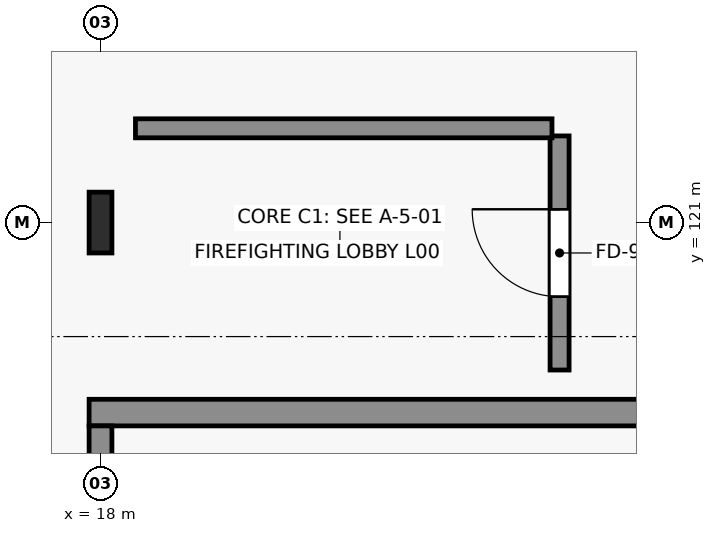
"""IFC4 building model, lengths in metres.
Left out: names, types, materials, properties, quantities, classifications, styles, units other than length and angle.
Written with IfcOpenShell. Run it as: python <this file> out.ifc"""

import sys

from ifc_helpers import new_model, si_unit, direction, frame, frame_2d, origin, origin_2d, place, context, subcontext, project, spatial, rectangle, i_section, extrude, element, fill, save


model = new_model("IFC4")
c1 = context("Model", 3, precision=1e-05, world=origin(), true_north=direction((0.0, 1.0)))
c2 = subcontext(c1, "Body", "Model", "MODEL_VIEW")
j1 = project(units=[si_unit("LENGTHUNIT", "METRE"), si_unit("PLANEANGLEUNIT", "RADIAN")], contexts=[c1])
p1 = place(None, origin())
s1 = spatial("IfcSite", under=j1, at=p1, CompositionType="ELEMENT")
p2 = place(p1, origin())
s2 = spatial("IfcBuilding", under=s1, at=p2, CompositionType="ELEMENT")
p3 = place(p2, origin())
s3 = spatial("IfcBuildingStorey", under=s2, at=p3, CompositionType="ELEMENT", Elevation=0.0)
p4 = place(p3, frame((18.0, 121.0, 0.0), z_axis=(0.0, 0.0, 1.0), x_axis=(1.0, 0.0, 0.0)))
e1 = element("IfcColumn", 1, at=p4, inside=s3, PredefinedType="COLUMN", context=c2, shape_type="SweptSolid", body=[
    extrude(i_section(OverallWidth=0.3, OverallDepth=0.8, WebThickness=0.018, FlangeThickness=0.033, FilletRadius=0.03, at=origin_2d()), origin(), (0.0, 0.0, 1.0), 4.61),
])
p5 = place(p3, frame((17.85, 118.5, 0.0), z_axis=(0.0, 0.0, 1.0), x_axis=(1.0, 0.0, 0.0)))
e2 = element("IfcWall", 2, at=p5, inside=s3, PredefinedType="SHEAR", context=c2, shape_type="SweptSolid", body=[
    extrude(rectangle(XDim=9.3, YDim=0.35, at=frame_2d((4.65, 0.0))), origin(), (0.0, 0.0, 1.0), 4.61),
])
p6 = place(p3, frame((18.0, 113.5, 0.0), z_axis=(0.0, 0.0, 1.0), x_axis=(0.0, 1.0, 0.0)))
e3 = element("IfcWall", 3, at=p6, inside=s3, PredefinedType="SHEAR", context=c2, shape_type="SweptSolid", body=[
    extrude(rectangle(XDim=4.825, YDim=0.3, at=frame_2d((2.413, 0.0))), origin(), (0.0, 0.0, 1.0), 4.61),
])
p7 = place(p3, frame((24.04, 119.06, 0.0), z_axis=(0.0, 0.0, 1.0), x_axis=(0.0, 1.0, 0.0)))
e4 = element("IfcWall", 4, at=p7, inside=s3, PredefinedType="SOLIDWALL", context=c2, shape_type="SweptSolid", body=[
    extrude(rectangle(XDim=3.08, YDim=0.25, at=frame_2d((1.54, 0.0))), origin(), (0.0, 0.0, 1.0), 4.03),
])
p8 = place(p7, frame((0.965, 0.0, 0.0)))
e5 = element("IfcOpeningElement", 5, at=p8, cuts=e4, PredefinedType="OPENING", context=c2, shape_type="SweptSolid", body=[
    extrude(rectangle(XDim=1.15, YDim=2.2, at=frame_2d((0.575, 1.1))), frame((0.0, 0.135, 0.0), z_axis=(0.0, -1.0, 0.0), x_axis=(1.0, 0.0, 0.0)), (0.0, 0.0, 1.0), 0.27),
])
p9 = place(p3, frame((18.46, 122.24, 0.0), z_axis=(0.0, 0.0, 1.0), x_axis=(1.0, 0.0, 0.0)))
e6 = element("IfcWall", 6, at=p9, inside=s3, PredefinedType="SOLIDWALL", context=c2, shape_type="SweptSolid", body=[
    extrude(rectangle(XDim=5.48, YDim=0.25, at=frame_2d((2.74, 0.0))), origin(), (0.0, 0.0, 1.0), 4.31),
])
p10 = place(p8, origin())
e7 = element("IfcDoor", 7, at=p10, inside=s3, OperationType="SINGLE_SWING_RIGHT", PredefinedType="DOOR", context=c2, shape_type="SweptSolid", body=[
    extrude(rectangle(XDim=1.15, YDim=2.2, at=frame_2d((0.575, 1.1))), frame((0.0, 0.025, 0.0), z_axis=(0.0, -1.0, 0.0), x_axis=(1.0, 0.0, 0.0)), (0.0, 0.0, 1.0), 0.05),
])
fill(e5, e7)
save(model, sys.argv[1])
